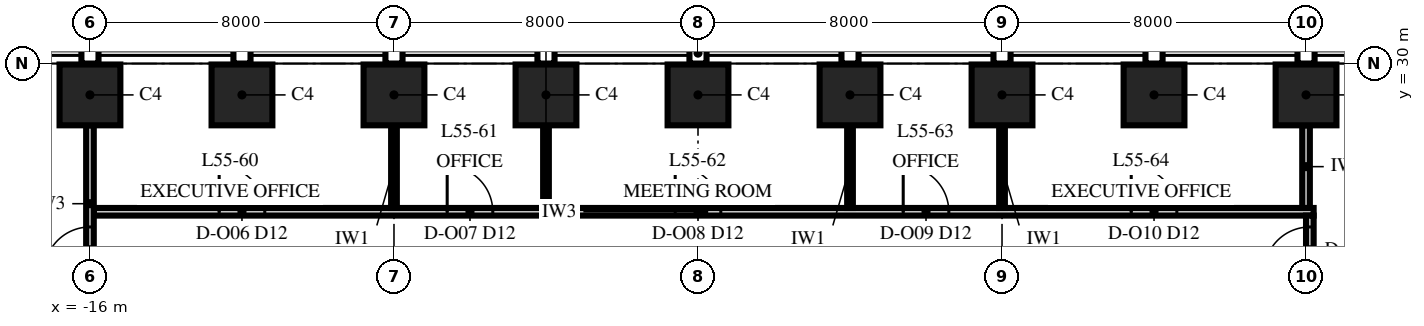
"""IFC4 building model, lengths in metres.
Left out: names, types, materials, properties, quantities, classifications, styles, units other than length and angle.
Written with IfcOpenShell. Run it as: python <this file> out.ifc"""

import sys

from ifc_helpers import new_model, si_unit, direction, frame, frame_2d, origin, origin_2d, place, context, subcontext, project, spatial, rectangle, extrude, element, fill, save


model = new_model("IFC4")
c1 = context("Model", 3, precision=1e-05, world=origin(), true_north=direction((0.0, 1.0)))
c2 = subcontext(c1, "Body", "Model", "MODEL_VIEW")
j1 = project(units=[si_unit("LENGTHUNIT", "METRE"), si_unit("PLANEANGLEUNIT", "RADIAN")], contexts=[c1])
p1 = place(None, origin())
s1 = spatial("IfcSite", under=j1, at=p1, CompositionType="ELEMENT")
p2 = place(p1, origin())
s2 = spatial("IfcBuilding", under=s1, at=p2, CompositionType="ELEMENT")
p3 = place(p2, frame((0.0, 0.0, 238.0)))
s3 = spatial("IfcBuildingStorey", under=s2, at=p3, CompositionType="ELEMENT", Elevation=238.0)
for number, where, z_axis, x_axis in (
    (1, (16.0, 29.175, 0.0), (0.0, 0.0, 1.0), (-1.0, 0.0, 0.0)),
    (2, (12.0, 29.175, 0.0), (0.0, 0.0, 1.0), (-1.0, 0.0, 0.0)),
    (3, (8.0, 29.175, 0.0), (0.0, 0.0, 1.0), (-1.0, 0.0, 0.0)),
    (4, (4.0, 29.175, 0.0), (0.0, 0.0, 1.0), (-1.0, 0.0, 0.0)),
    (5, (0.0, 29.175, 0.0), (0.0, 0.0, 1.0), (-1.0, 0.0, 0.0)),
    (6, (-4.0, 29.175, 0.0), (0.0, 0.0, 1.0), (-1.0, 0.0, 0.0)),
    (7, (-8.0, 29.175, 0.0), (0.0, 0.0, 1.0), (-1.0, 0.0, 0.0)),
    (8, (-12.0, 29.175, 0.0), (0.0, 0.0, 1.0), (-1.0, 0.0, 0.0)),
    (9, (-16.0, 29.175, 0.0), (0.0, 0.0, 1.0), (-1.0, 0.0, 0.0)),
):
    element("IfcColumn", number, at=place(p3, frame(where, z_axis=z_axis, x_axis=x_axis)), inside=s3, PredefinedType="COLUMN", context=c2, shape_type="SweptSolid", body=[
        extrude(rectangle(XDim=1.6, YDim=1.6, at=origin_2d()), origin(), (0.0, 0.0, 1.0), 4.0),
    ])
p4 = place(p3, frame((-15.9, 26.1, 0.0), z_axis=(0.0, 0.0, 1.0), x_axis=(1.0, 0.0, 0.0)))
e10 = element("IfcWall", 10, at=p4, inside=s3, PredefinedType="PARTITIONING", context=c2, shape_type="SweptSolid", body=[
    extrude(rectangle(XDim=32.1, YDim=0.2, at=frame_2d((16.05, 0.0))), origin(), (0.0, 0.0, 1.0), 3.318),
])
p5 = place(p4, frame((3.3, 0.0, 0.0)))
e11 = element("IfcOpeningElement", 11, at=p5, cuts=e10, PredefinedType="OPENING", context=c2, shape_type="SweptSolid", body=[
    extrude(rectangle(XDim=1.2, YDim=2.4, at=frame_2d((0.6, 1.2))), frame((0.0, 0.115, 0.0), z_axis=(0.0, -1.0, 0.0), x_axis=(1.0, 0.0, 0.0)), (0.0, 0.0, 1.0), 0.23),
])
p6 = place(p4, frame((9.3, 0.0, 0.0)))
e12 = element("IfcOpeningElement", 12, at=p6, cuts=e10, PredefinedType="OPENING", context=c2, shape_type="SweptSolid", body=[
    extrude(rectangle(XDim=1.2, YDim=2.4, at=frame_2d((0.6, 1.2))), frame((0.0, 0.115, 0.0), z_axis=(0.0, -1.0, 0.0), x_axis=(1.0, 0.0, 0.0)), (0.0, 0.0, 1.0), 0.23),
])
p7 = place(p4, frame((15.3, 0.0, 0.0)))
e13 = element("IfcOpeningElement", 13, at=p7, cuts=e10, PredefinedType="OPENING", context=c2, shape_type="SweptSolid", body=[
    extrude(rectangle(XDim=1.2, YDim=2.4, at=frame_2d((0.6, 1.2))), frame((0.0, 0.115, 0.0), z_axis=(0.0, -1.0, 0.0), x_axis=(1.0, 0.0, 0.0)), (0.0, 0.0, 1.0), 0.23),
])
p8 = place(p4, frame((21.3, 0.0, 0.0)))
e14 = element("IfcOpeningElement", 14, at=p8, cuts=e10, PredefinedType="OPENING", context=c2, shape_type="SweptSolid", body=[
    extrude(rectangle(XDim=1.2, YDim=2.4, at=frame_2d((0.6, 1.2))), frame((0.0, 0.115, 0.0), z_axis=(0.0, -1.0, 0.0), x_axis=(1.0, 0.0, 0.0)), (0.0, 0.0, 1.0), 0.23),
])
p9 = place(p4, frame((27.3, 0.0, 0.0)))
e15 = element("IfcOpeningElement", 15, at=p9, cuts=e10, PredefinedType="OPENING", context=c2, shape_type="SweptSolid", body=[
    extrude(rectangle(XDim=1.2, YDim=2.4, at=frame_2d((0.6, 1.2))), frame((0.0, 0.115, 0.0), z_axis=(0.0, -1.0, 0.0), x_axis=(1.0, 0.0, 0.0)), (0.0, 0.0, 1.0), 0.23),
])
p10 = place(p3, frame((-16.0, 24.25, 0.0), z_axis=(0.0, 0.0, 1.0), x_axis=(0.0, 1.0, 0.0)))
e16 = element("IfcWall", 16, at=p10, inside=s3, PredefinedType="PARTITIONING", context=c2, shape_type="SweptSolid", body=[
    extrude(rectangle(XDim=4.125, YDim=0.2, at=frame_2d((2.062, 0.0))), origin(), (0.0, 0.0, 1.0), 3.226),
])
p11 = place(p10, frame((0.25, 0.0, 0.0)))
e17 = element("IfcOpeningElement", 17, at=p11, cuts=e16, PredefinedType="OPENING", context=c2, shape_type="SweptSolid", body=[
    extrude(rectangle(XDim=1.2, YDim=2.4, at=frame_2d((0.6, 1.2))), frame((0.0, 0.115, 0.0), z_axis=(0.0, -1.0, 0.0), x_axis=(1.0, 0.0, 0.0)), (0.0, 0.0, 1.0), 0.23),
])
for number, where, z_axis, x_axis in (
    (18, (-8.0, 26.2, 0.0), (0.0, 0.0, 1.0), (0.0, 1.0, 0.0)),
    (19, (-4.0, 26.2, 0.0), (0.0, 0.0, 1.0), (0.0, 1.0, 0.0)),
    (20, (4.0, 26.2, 0.0), (0.0, 0.0, 1.0), (0.0, 1.0, 0.0)),
    (21, (8.0, 26.2, 0.0), (0.0, 0.0, 1.0), (0.0, 1.0, 0.0)),
):
    element("IfcWall", number, at=place(p3, frame(where, z_axis=z_axis, x_axis=x_axis)), inside=s3, PredefinedType="PARTITIONING", context=c2, shape_type="SweptSolid", body=[
        extrude(rectangle(XDim=2.175, YDim=0.15, at=frame_2d((1.087, 0.0))), origin(), (0.0, 0.0, 1.0), 3.318),
    ])
p12 = place(p3, frame((16.0, 26.2, 0.0), z_axis=(0.0, 0.0, 1.0), x_axis=(0.0, 1.0, 0.0)))
e22 = element("IfcWall", 22, at=p12, inside=s3, PredefinedType="PARTITIONING", context=c2, shape_type="SweptSolid", body=[
    extrude(rectangle(XDim=2.175, YDim=0.2, at=frame_2d((1.087, 0.0))), origin(), (0.0, 0.0, 1.0), 3.318),
])
p13 = place(p3, frame((16.1, 9.9, 0.0), z_axis=(0.0, 0.0, 1.0), x_axis=(0.0, 1.0, 0.0)))
e23 = element("IfcWall", 23, at=p13, inside=s3, PredefinedType="PARTITIONING", context=c2, shape_type="SweptSolid", body=[
    extrude(rectangle(XDim=16.1, YDim=0.2, at=frame_2d((8.05, 0.0))), origin(), (0.0, 0.0, 1.0), 3.13),
])
p14 = place(p13, frame((14.6, 0.0, 0.0)))
e24 = element("IfcOpeningElement", 24, at=p14, cuts=e23, PredefinedType="OPENING", context=c2, shape_type="SweptSolid", body=[
    extrude(rectangle(XDim=1.2, YDim=2.4, at=frame_2d((0.6, 1.2))), frame((0.0, 0.115, 0.0), z_axis=(0.0, -1.0, 0.0), x_axis=(1.0, 0.0, 0.0)), (0.0, 0.0, 1.0), 0.23),
])
p15 = place(p5, origin())
e25 = element("IfcDoor", 25, at=p15, inside=s3, OperationType="SINGLE_SWING_LEFT", PredefinedType="DOOR", context=c2, shape_type="SweptSolid", body=[
    extrude(rectangle(XDim=1.2, YDim=2.4, at=frame_2d((0.6, 1.2))), frame((0.0, 0.1, 0.0), z_axis=(0.0, -1.0, 0.0), x_axis=(1.0, 0.0, 0.0)), (0.0, 0.0, 1.0), 0.199),
])
fill(e11, e25)
p16 = place(p6, origin())
e26 = element("IfcDoor", 26, at=p16, inside=s3, OperationType="SINGLE_SWING_LEFT", PredefinedType="DOOR", context=c2, shape_type="SweptSolid", body=[
    extrude(rectangle(XDim=1.2, YDim=2.4, at=frame_2d((0.6, 1.2))), frame((0.0, 0.1, 0.0), z_axis=(0.0, -1.0, 0.0), x_axis=(1.0, 0.0, 0.0)), (0.0, 0.0, 1.0), 0.199),
])
fill(e12, e26)
p17 = place(p7, origin())
e27 = element("IfcDoor", 27, at=p17, inside=s3, OperationType="SINGLE_SWING_LEFT", PredefinedType="DOOR", context=c2, shape_type="SweptSolid", body=[
    extrude(rectangle(XDim=1.2, YDim=2.4, at=frame_2d((0.6, 1.2))), frame((0.0, 0.1, 0.0), z_axis=(0.0, -1.0, 0.0), x_axis=(1.0, 0.0, 0.0)), (0.0, 0.0, 1.0), 0.199),
])
fill(e13, e27)
p18 = place(p8, origin())
e28 = element("IfcDoor", 28, at=p18, inside=s3, OperationType="SINGLE_SWING_LEFT", PredefinedType="DOOR", context=c2, shape_type="SweptSolid", body=[
    extrude(rectangle(XDim=1.2, YDim=2.4, at=frame_2d((0.6, 1.2))), frame((0.0, 0.1, 0.0), z_axis=(0.0, -1.0, 0.0), x_axis=(1.0, 0.0, 0.0)), (0.0, 0.0, 1.0), 0.199),
])
fill(e14, e28)
p19 = place(p9, origin())
e29 = element("IfcDoor", 29, at=p19, inside=s3, OperationType="SINGLE_SWING_LEFT", PredefinedType="DOOR", context=c2, shape_type="SweptSolid", body=[
    extrude(rectangle(XDim=1.2, YDim=2.4, at=frame_2d((0.6, 1.2))), frame((0.0, 0.1, 0.0), z_axis=(0.0, -1.0, 0.0), x_axis=(1.0, 0.0, 0.0)), (0.0, 0.0, 1.0), 0.199),
])
fill(e15, e29)
p20 = place(p11, origin())
e30 = element("IfcDoor", 30, at=p20, inside=s3, OperationType="SINGLE_SWING_LEFT", PredefinedType="DOOR", context=c2, shape_type="SweptSolid", body=[
    extrude(rectangle(XDim=1.2, YDim=2.4, at=frame_2d((0.6, 1.2))), frame((0.0, 0.1, 0.0), z_axis=(0.0, -1.0, 0.0), x_axis=(1.0, 0.0, 0.0)), (0.0, 0.0, 1.0), 0.199),
])
fill(e17, e30)
p21 = place(p14, origin())
e31 = element("IfcDoor", 31, at=p21, inside=s3, OperationType="SINGLE_SWING_LEFT", PredefinedType="DOOR", context=c2, shape_type="SweptSolid", body=[
    extrude(rectangle(XDim=1.2, YDim=2.4, at=frame_2d((0.6, 1.2))), frame((0.0, 0.1, 0.0), z_axis=(0.0, -1.0, 0.0), x_axis=(1.0, 0.0, 0.0)), (0.0, 0.0, 1.0), 0.199),
])
fill(e24, e31)
save(model, sys.argv[1])
